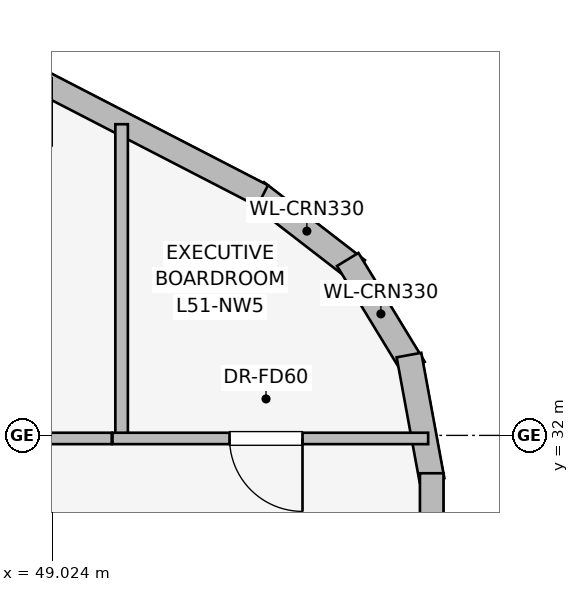
"""IFC4 building model, lengths in metres.
Left out: names, types, materials, properties, quantities, classifications, styles, units other than length and angle.
Written with IfcOpenShell. Run it as: python <this file> out.ifc"""

import sys

from ifc_helpers import new_model, si_unit, direction, frame, frame_2d, origin, place, context, subcontext, project, spatial, rectangle, extrude, element, fill, save


model = new_model("IFC4")
c1 = context("Model", 3, precision=1e-05, world=origin(), true_north=direction((0.0, 1.0)))
c2 = subcontext(c1, "Body", "Model", "MODEL_VIEW")
j1 = project(units=[si_unit("LENGTHUNIT", "METRE"), si_unit("PLANEANGLEUNIT", "RADIAN")], contexts=[c1])
p1 = place(None, origin())
s1 = spatial("IfcSite", under=j1, at=p1, CompositionType="ELEMENT")
p2 = place(p1, origin())
s2 = spatial("IfcBuilding", under=s1, at=p2, CompositionType="ELEMENT")
p3 = place(p2, frame((0.0, 0.0, 187.8)))
s3 = spatial("IfcBuildingStorey", under=s2, at=p3, CompositionType="ELEMENT", Elevation=187.8)
p4 = place(p3, frame((51.711, 35.2, 0.0), z_axis=(0.0, 0.0, 1.0), x_axis=(0.791464279355, -0.611215423976, 0.0)))
e1 = element("IfcWall", 1, at=p4, inside=s3, PredefinedType="STANDARD", context=c2, shape_type="SweptSolid", body=[
    extrude(rectangle(XDim=1.677, YDim=0.33, at=frame_2d((0.838, 0.0))), origin(), (0.0, 0.0, 1.0), 3.14),
])
p5 = place(p3, frame((52.912, 34.315, 0.0), z_axis=(0.0, 0.0, 1.0), x_axis=(0.520219286058, -0.85403272444, 0.0)))
e2 = element("IfcWall", 2, at=p5, inside=s3, PredefinedType="STANDARD", context=c2, shape_type="SweptSolid", body=[
    extrude(rectangle(XDim=1.678, YDim=0.33, at=frame_2d((0.839, 0.0))), origin(), (0.0, 0.0, 1.0), 3.14),
])
p6 = place(p3, frame((53.718, 33.057, 0.0), z_axis=(0.0, 0.0, 1.0), x_axis=(0.180717642671, -0.983535019014, 0.0)))
e3 = element("IfcWall", 3, at=p6, inside=s3, PredefinedType="STANDARD", context=c2, shape_type="SweptSolid", body=[
    extrude(rectangle(XDim=1.677, YDim=0.33, at=frame_2d((0.838, 0.0))), origin(), (0.0, 0.0, 1.0), 3.14),
])
p7 = place(p3, frame((36.838, 42.871, 0.0), z_axis=(0.0, 0.0, 1.0), x_axis=(0.888626188278, -0.458632202867, 0.0)))
e4 = element("IfcWall", 4, at=p7, inside=s3, PredefinedType="STANDARD", context=c2, shape_type="SweptSolid", body=[
    extrude(rectangle(XDim=16.828, YDim=0.31, at=frame_2d((8.414, 0.0))), origin(), (0.0, 0.0, 1.0), 3.14),
])
p8 = place(p7, frame((7.864, 0.0, 0.0)))
e5 = element("IfcOpeningElement", 5, at=p8, cuts=e4, PredefinedType="OPENING", context=c2, shape_type="SweptSolid", body=[
    extrude(rectangle(XDim=1.1, YDim=2.04, at=frame_2d((0.55, 1.02))), frame((0.0, 0.165, 0.0), z_axis=(0.0, -1.0, 0.0), x_axis=(1.0, 0.0, 0.0)), (0.0, 0.0, 1.0), 0.33),
])
p9 = place(p7, frame((1.516, 0.0, 0.75)))
e6 = element("IfcOpeningElement", 6, at=p9, cuts=e4, PredefinedType="OPENING", context=c2, shape_type="SweptSolid", body=[
    extrude(rectangle(XDim=1.05, YDim=1.4, at=frame_2d((0.525, 0.7))), frame((0.0, 0.165, 0.0), z_axis=(0.0, -1.0, 0.0), x_axis=(1.0, 0.0, 0.0)), (0.0, 0.0, 1.0), 0.33),
])
p10 = place(p7, frame((5.745, 0.0, 0.75)))
e7 = element("IfcOpeningElement", 7, at=p10, cuts=e4, PredefinedType="OPENING", context=c2, shape_type="SweptSolid", body=[
    extrude(rectangle(XDim=1.35, YDim=1.45, at=frame_2d((0.675, 0.725))), frame((0.0, 0.165, 0.0), z_axis=(0.0, -1.0, 0.0), x_axis=(1.0, 0.0, 0.0)), (0.0, 0.0, 1.0), 0.33),
])
p11 = place(p7, frame((10.774, 0.0, 0.75)))
e8 = element("IfcOpeningElement", 8, at=p11, cuts=e4, PredefinedType="OPENING", context=c2, shape_type="SweptSolid", body=[
    extrude(rectangle(XDim=2.0, YDim=1.5, at=frame_2d((1.0, 0.75))), frame((0.0, 0.165, 0.0), z_axis=(0.0, -1.0, 0.0), x_axis=(1.0, 0.0, 0.0)), (0.0, 0.0, 1.0), 0.33),
])
p12 = place(p3, frame((54.017, 31.502, 0.0), z_axis=(0.0, 0.0, 1.0), x_axis=(0.0, -1.0, 0.0)))
e9 = element("IfcWall", 9, at=p12, inside=s3, PredefinedType="STANDARD", context=c2, shape_type="SweptSolid", body=[
    extrude(rectangle(XDim=15.004, YDim=0.31, at=frame_2d((7.502, 0.0))), origin(), (0.0, 0.0, 1.0), 3.14),
])
p13 = place(p12, frame((4.353, 0.0, 0.75)))
e10 = element("IfcOpeningElement", 10, at=p13, cuts=e9, PredefinedType="OPENING", context=c2, shape_type="SweptSolid", body=[
    extrude(rectangle(XDim=2.0, YDim=1.5, at=frame_2d((1.0, 0.75))), frame((0.0, 0.165, 0.0), z_axis=(0.0, -1.0, 0.0), x_axis=(1.0, 0.0, 0.0)), (0.0, 0.0, 1.0), 0.33),
])
p14 = place(p12, frame((8.083, 0.0, 0.75)))
e11 = element("IfcOpeningElement", 11, at=p14, cuts=e9, PredefinedType="OPENING", context=c2, shape_type="SweptSolid", body=[
    extrude(rectangle(XDim=1.35, YDim=1.45, at=frame_2d((0.675, 0.725))), frame((0.0, 0.165, 0.0), z_axis=(0.0, -1.0, 0.0), x_axis=(1.0, 0.0, 0.0)), (0.0, 0.0, 1.0), 0.33),
])
p15 = place(p12, frame((9.87, 0.0, 0.75)))
e12 = element("IfcOpeningElement", 12, at=p15, cuts=e9, PredefinedType="OPENING", context=c2, shape_type="SweptSolid", body=[
    extrude(rectangle(XDim=1.35, YDim=1.45, at=frame_2d((0.675, 0.725))), frame((0.0, 0.165, 0.0), z_axis=(0.0, -1.0, 0.0), x_axis=(1.0, 0.0, 0.0)), (0.0, 0.0, 1.0), 0.33),
])
p16 = place(p3, frame((49.937, 31.97, 0.0), z_axis=(0.0, 0.0, 1.0), x_axis=(0.0, 1.0, 0.0)))
e13 = element("IfcWall", 13, at=p16, inside=s3, PredefinedType="PARTITIONING", context=c2, shape_type="SweptSolid", body=[
    extrude(rectangle(XDim=4.124, YDim=0.165, at=frame_2d((2.062, 0.0))), origin(), (0.0, 0.0, 1.0), 3.14),
])
p17 = place(p3, frame((49.807, 31.96, 0.0), z_axis=(0.0, 0.0, 1.0), x_axis=(-1.0, 0.0, 0.0)))
e14 = element("IfcWall", 14, at=p17, inside=s3, PredefinedType="PARTITIONING", context=c2, shape_type="SweptSolid", body=[
    extrude(rectangle(XDim=3.818, YDim=0.15, at=frame_2d((1.909, 0.0))), origin(), (0.0, 0.0, 1.0), 3.14),
])
p18 = place(p17, frame((1.372, 0.0, 0.0)))
e15 = element("IfcOpeningElement", 15, at=p18, cuts=e14, PredefinedType="OPENING", context=c2, shape_type="SweptSolid", body=[
    extrude(rectangle(XDim=0.96, YDim=2.0, at=frame_2d((0.48, 1.0))), frame((0.0, 0.085, 0.0), z_axis=(0.0, -1.0, 0.0), x_axis=(1.0, 0.0, 0.0)), (0.0, 0.0, 1.0), 0.17),
])
p19 = place(p3, frame((53.97, 31.96, 0.0), z_axis=(0.0, 0.0, 1.0), x_axis=(-1.0, 0.0, 0.0)))
e16 = element("IfcWall", 16, at=p19, inside=s3, PredefinedType="PARTITIONING", context=c2, shape_type="SweptSolid", body=[
    extrude(rectangle(XDim=4.153, YDim=0.15, at=frame_2d((2.077, 0.0))), origin(), (0.0, 0.0, 1.0), 3.14),
])
p20 = place(p19, frame((1.653, 0.0, 0.0)))
e17 = element("IfcOpeningElement", 17, at=p20, cuts=e16, PredefinedType="OPENING", context=c2, shape_type="SweptSolid", body=[
    extrude(rectangle(XDim=0.96, YDim=2.0, at=frame_2d((0.48, 1.0))), frame((0.0, 0.085, 0.0), z_axis=(0.0, -1.0, 0.0), x_axis=(1.0, 0.0, 0.0)), (0.0, 0.0, 1.0), 0.17),
])
p21 = place(p20, origin())
e18 = element("IfcDoor", 18, at=p21, inside=s3, OperationType="SINGLE_SWING_LEFT", PredefinedType="DOOR", context=c2, shape_type="SweptSolid", body=[
    extrude(rectangle(XDim=0.96, YDim=2.0, at=frame_2d((0.48, 1.0))), frame((0.0, 0.025, 0.0), z_axis=(0.0, -1.0, 0.0), x_axis=(1.0, 0.0, 0.0)), (0.0, 0.0, 1.0), 0.05),
])
fill(e17, e18)
save(model, sys.argv[1])
